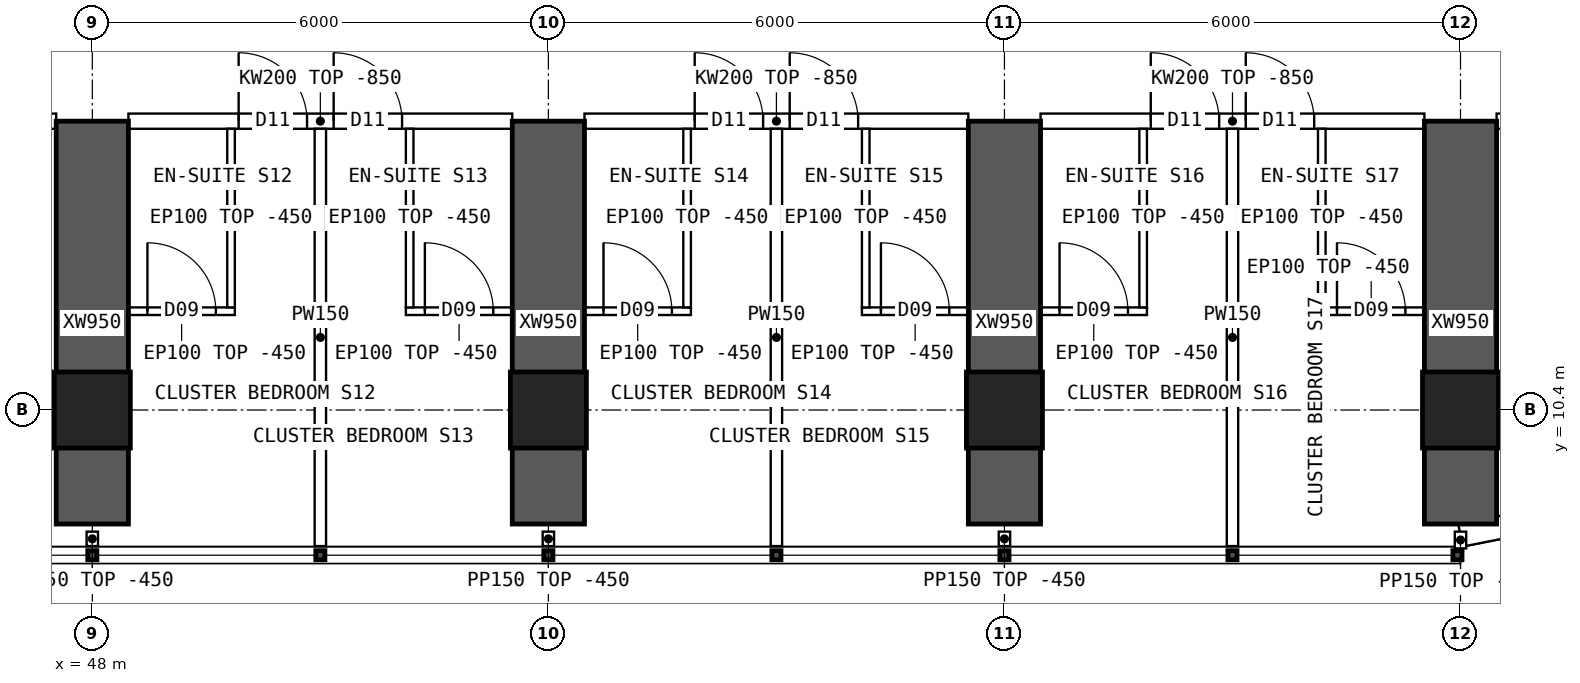
"""IFC4 building model, lengths in metres.
Left out: names, types, materials, properties, quantities, classifications, styles, units other than length and angle.
Written with IfcOpenShell. Run it as: python <this file> out.ifc"""

import sys

from ifc_helpers import new_model, si_unit, direction, frame, frame_2d, origin, origin_2d, place, context, subcontext, project, spatial, polyline, rectangle, hollow_rectangle, outline, extrude, element, fill, save


model = new_model("IFC4")
c1 = context("Model", 3, precision=1e-05, world=origin(), true_north=direction((0.0, 1.0)))
c2 = subcontext(c1, "Body", "Model", "MODEL_VIEW")
j1 = project(units=[si_unit("LENGTHUNIT", "METRE"), si_unit("PLANEANGLEUNIT", "RADIAN")], contexts=[c1])
p1 = place(None, origin())
s1 = spatial("IfcSite", under=j1, at=p1, CompositionType="ELEMENT")
p2 = place(p1, origin())
s2 = spatial("IfcBuilding", under=s1, at=p2, CompositionType="ELEMENT")
p3 = place(p2, frame((0.0, 0.0, 80.65)))
s3 = spatial("IfcBuildingStorey", under=s2, at=p3, CompositionType="ELEMENT", Elevation=80.65)
for number, where, z_axis, x_axis in (
    (1, (48.0, 10.4, 0.0), (0.0, 0.0, 1.0), (1.0, 0.0, 0.0)),
    (2, (54.0, 10.4, 0.0), (0.0, 0.0, 1.0), (1.0, 0.0, 0.0)),
    (3, (60.0, 10.4, 0.0), (0.0, 0.0, 1.0), (1.0, 0.0, 0.0)),
    (4, (66.0, 10.4, 0.0), (0.0, 0.0, 1.0), (1.0, 0.0, 0.0)),
):
    element("IfcColumn", number, at=place(p3, frame(where, z_axis=z_axis, x_axis=x_axis)), inside=s3, PredefinedType="COLUMN", context=c2, shape_type="SweptSolid", body=[
        extrude(hollow_rectangle(XDim=1.0, YDim=1.0, WallThickness=0.1, at=origin_2d()), origin(), (0.0, 0.0, 1.0), 3.75),
    ])
for number, where, z_axis, x_axis in (
    (5, (48.0, 8.9, 0.0), (0.0, 0.0, 1.0), (0.0, 1.0, 0.0)),
    (6, (54.0, 8.9, 0.0), (0.0, 0.0, 1.0), (0.0, 1.0, 0.0)),
    (7, (60.0, 8.9, 0.0), (0.0, 0.0, 1.0), (0.0, 1.0, 0.0)),
    (8, (66.0, 8.9, 0.0), (0.0, 0.0, 1.0), (0.0, 1.0, 0.0)),
):
    element("IfcWall", number, at=place(p3, frame(where, z_axis=z_axis, x_axis=x_axis)), inside=s3, PredefinedType="SHEAR", context=c2, shape_type="SweptSolid", body=[
        extrude(rectangle(XDim=5.3, YDim=0.95, at=frame_2d((2.65, 0.0))), origin(), (0.0, 0.0, 1.0), 3.75),
    ])
p4 = place(p3, frame((66.0, 8.75, 0.0), z_axis=(0.0, 0.0, 1.0), x_axis=(0.980791473772, 0.195059183267, 0.0)))
e9 = element("IfcWall", 9, at=p4, inside=s3, PredefinedType="SOLIDWALL", context=c2, shape_type="SweptSolid", body=[
    extrude(outline(polyline([(-0.03, -0.15), (3.717, -0.15), (3.657, 0.15), (0.03, 0.15), (-0.03, -0.15)])), origin(), (0.0, 0.0, 1.0), 3.3),
])
p5 = place(p4, frame((1.144, 0.0, 0.9)))
e10 = element("IfcOpeningElement", 10, at=p5, cuts=e9, PredefinedType="OPENING", context=c2, shape_type="SweptSolid", body=[
    extrude(rectangle(XDim=1.4, YDim=1.8, at=frame_2d((0.7, 0.9))), frame((0.0, 0.16, 0.0), z_axis=(0.0, -1.0, 0.0), x_axis=(1.0, 0.0, 0.0)), (0.0, 0.0, 1.0), 0.32),
])
p6 = place(p3, frame((42.475, 14.2, 0.0), z_axis=(0.0, 0.0, 1.0), x_axis=(1.0, 0.0, 0.0)))
e11 = element("IfcWall", 11, at=p6, inside=s3, PredefinedType="SOLIDWALL", context=c2, shape_type="SweptSolid", body=[
    extrude(outline(polyline([(0.0, 0.0), (5.05, 0.0), (5.05, 2.9), (0.0, 2.9), (0.0, 0.0)])), frame((0.0, 0.1, 0.0), z_axis=(0.0, -1.0, 0.0), x_axis=(1.0, 0.0, 0.0)), (0.0, 0.0, 1.0), 0.2),
])
p7 = place(p6, frame((0.6, 0.0, 0.0)))
e12 = element("IfcOpeningElement", 12, at=p7, cuts=e11, PredefinedType="OPENING", context=c2, shape_type="SweptSolid", body=[
    extrude(rectangle(XDim=1.0, YDim=2.1, at=frame_2d((0.5, 1.05))), frame((0.0, 0.11, 0.0), z_axis=(0.0, -1.0, 0.0), x_axis=(1.0, 0.0, 0.0)), (0.0, 0.0, 1.0), 0.22),
])
p8 = place(p3, frame((48.475, 14.2, 0.0), z_axis=(0.0, 0.0, 1.0), x_axis=(1.0, 0.0, 0.0)))
e13 = element("IfcWall", 13, at=p8, inside=s3, PredefinedType="SOLIDWALL", context=c2, shape_type="SweptSolid", body=[
    extrude(outline(polyline([(0.0, 0.0), (5.05, 0.0), (5.05, 2.9), (0.0, 2.9), (0.0, 0.0)])), frame((0.0, 0.1, 0.0), z_axis=(0.0, -1.0, 0.0), x_axis=(1.0, 0.0, 0.0)), (0.0, 0.0, 1.0), 0.2),
])
p9 = place(p8, frame((1.45, 0.0, 0.0)))
e14 = element("IfcOpeningElement", 14, at=p9, cuts=e13, PredefinedType="OPENING", context=c2, shape_type="SweptSolid", body=[
    extrude(rectangle(XDim=0.9, YDim=2.1, at=frame_2d((0.45, 1.05))), frame((0.0, 0.11, 0.0), z_axis=(0.0, -1.0, 0.0), x_axis=(1.0, 0.0, 0.0)), (0.0, 0.0, 1.0), 0.22),
])
p10 = place(p8, frame((2.7, 0.0, 0.0)))
e15 = element("IfcOpeningElement", 15, at=p10, cuts=e13, PredefinedType="OPENING", context=c2, shape_type="SweptSolid", body=[
    extrude(rectangle(XDim=0.9, YDim=2.1, at=frame_2d((0.45, 1.05))), frame((0.0, 0.11, 0.0), z_axis=(0.0, -1.0, 0.0), x_axis=(1.0, 0.0, 0.0)), (0.0, 0.0, 1.0), 0.22),
])
p11 = place(p3, frame((54.475, 14.2, 0.0), z_axis=(0.0, 0.0, 1.0), x_axis=(1.0, 0.0, 0.0)))
e16 = element("IfcWall", 16, at=p11, inside=s3, PredefinedType="SOLIDWALL", context=c2, shape_type="SweptSolid", body=[
    extrude(outline(polyline([(0.0, 0.0), (5.05, 0.0), (5.05, 2.9), (0.0, 2.9), (0.0, 0.0)])), frame((0.0, 0.1, 0.0), z_axis=(0.0, -1.0, 0.0), x_axis=(1.0, 0.0, 0.0)), (0.0, 0.0, 1.0), 0.2),
])
p12 = place(p11, frame((1.45, 0.0, 0.0)))
e17 = element("IfcOpeningElement", 17, at=p12, cuts=e16, PredefinedType="OPENING", context=c2, shape_type="SweptSolid", body=[
    extrude(rectangle(XDim=0.9, YDim=2.1, at=frame_2d((0.45, 1.05))), frame((0.0, 0.11, 0.0), z_axis=(0.0, -1.0, 0.0), x_axis=(1.0, 0.0, 0.0)), (0.0, 0.0, 1.0), 0.22),
])
p13 = place(p11, frame((2.7, 0.0, 0.0)))
e18 = element("IfcOpeningElement", 18, at=p13, cuts=e16, PredefinedType="OPENING", context=c2, shape_type="SweptSolid", body=[
    extrude(rectangle(XDim=0.9, YDim=2.1, at=frame_2d((0.45, 1.05))), frame((0.0, 0.11, 0.0), z_axis=(0.0, -1.0, 0.0), x_axis=(1.0, 0.0, 0.0)), (0.0, 0.0, 1.0), 0.22),
])
p14 = place(p3, frame((60.475, 14.2, 0.0), z_axis=(0.0, 0.0, 1.0), x_axis=(1.0, 0.0, 0.0)))
e19 = element("IfcWall", 19, at=p14, inside=s3, PredefinedType="SOLIDWALL", context=c2, shape_type="SweptSolid", body=[
    extrude(outline(polyline([(0.0, 0.0), (5.05, 0.0), (5.05, 2.9), (0.0, 2.9), (0.0, 0.0)])), frame((0.0, 0.1, 0.0), z_axis=(0.0, -1.0, 0.0), x_axis=(1.0, 0.0, 0.0)), (0.0, 0.0, 1.0), 0.2),
])
p15 = place(p14, frame((1.45, 0.0, 0.0)))
e20 = element("IfcOpeningElement", 20, at=p15, cuts=e19, PredefinedType="OPENING", context=c2, shape_type="SweptSolid", body=[
    extrude(rectangle(XDim=0.9, YDim=2.1, at=frame_2d((0.45, 1.05))), frame((0.0, 0.11, 0.0), z_axis=(0.0, -1.0, 0.0), x_axis=(1.0, 0.0, 0.0)), (0.0, 0.0, 1.0), 0.22),
])
p16 = place(p14, frame((2.7, 0.0, 0.0)))
e21 = element("IfcOpeningElement", 21, at=p16, cuts=e19, PredefinedType="OPENING", context=c2, shape_type="SweptSolid", body=[
    extrude(rectangle(XDim=0.9, YDim=2.1, at=frame_2d((0.45, 1.05))), frame((0.0, 0.11, 0.0), z_axis=(0.0, -1.0, 0.0), x_axis=(1.0, 0.0, 0.0)), (0.0, 0.0, 1.0), 0.22),
])
p17 = place(p3, frame((66.475, 14.2, 0.0), z_axis=(0.0, 0.0, 1.0), x_axis=(1.0, 0.0, 0.0)))
e22 = element("IfcWall", 22, at=p17, inside=s3, PredefinedType="SOLIDWALL", context=c2, shape_type="SweptSolid", body=[
    extrude(rectangle(XDim=1.925, YDim=0.2, at=frame_2d((0.962, 0.0))), origin(), (0.0, 0.0, 1.0), 3.3),
])
p18 = place(p17, frame((0.2, 0.0, 0.0)))
e23 = element("IfcOpeningElement", 23, at=p18, cuts=e22, PredefinedType="OPENING", context=c2, shape_type="SweptSolid", body=[
    extrude(rectangle(XDim=0.9, YDim=2.1, at=frame_2d((0.45, 1.05))), frame((0.0, 0.11, 0.0), z_axis=(0.0, -1.0, 0.0), x_axis=(1.0, 0.0, 0.0)), (0.0, 0.0, 1.0), 0.22),
])
p19 = place(p3, frame((51.0, 8.61, 0.0), z_axis=(0.0, 0.0, 1.0), x_axis=(0.0, 1.0, 0.0)))
e24 = element("IfcWall", 24, at=p19, inside=s3, PredefinedType="PARTITIONING", context=c2, shape_type="SweptSolid", body=[
    extrude(outline(polyline([(0.0, 0.0), (5.49, 0.0), (5.49, 2.9), (5.442, 2.9), (5.44, 3.3), (1.992, 3.3), (1.99, 2.9), (1.592, 2.9), (1.59, 3.3), (0.0, 3.3), (0.0, 0.0)])), frame((0.0, 0.075, 0.0), z_axis=(0.0, -1.0, 0.0), x_axis=(1.0, 0.0, 0.0)), (0.0, 0.0, 1.0), 0.15),
])
p20 = place(p3, frame((49.875, 11.7, 0.0), z_axis=(0.0, 0.0, 1.0), x_axis=(-1.0, 0.0, 0.0)))
e25 = element("IfcWall", 25, at=p20, inside=s3, PredefinedType="PARTITIONING", context=c2, shape_type="SweptSolid", body=[
    extrude(rectangle(XDim=1.4, YDim=0.1, at=frame_2d((0.7, 0.0))), origin(), (0.0, 0.0, 1.0), 3.3),
])
p21 = place(p20, frame((0.25, 0.0, 0.0)))
e26 = element("IfcOpeningElement", 26, at=p21, cuts=e25, PredefinedType="OPENING", context=c2, shape_type="SweptSolid", body=[
    extrude(rectangle(XDim=0.9, YDim=2.1, at=frame_2d((0.45, 1.05))), frame((0.0, 0.06, 0.0), z_axis=(0.0, -1.0, 0.0), x_axis=(1.0, 0.0, 0.0)), (0.0, 0.0, 1.0), 0.12),
])
p22 = place(p3, frame((49.825, 11.75, 0.0), z_axis=(0.0, 0.0, 1.0), x_axis=(0.0, 1.0, 0.0)))
e27 = element("IfcWall", 27, at=p22, inside=s3, PredefinedType="PARTITIONING", context=c2, shape_type="SweptSolid", body=[
    extrude(outline(polyline([(0.0, 0.0), (2.35, 0.0), (2.35, 2.9), (2.302, 2.9), (2.3, 3.3), (0.0, 3.3), (0.0, 0.0)])), frame((0.0, 0.05, 0.0), z_axis=(0.0, -1.0, 0.0), x_axis=(1.0, 0.0, 0.0)), (0.0, 0.0, 1.0), 0.1),
])
p23 = place(p3, frame((53.525, 11.7, 0.0), z_axis=(0.0, 0.0, 1.0), x_axis=(-1.0, 0.0, 0.0)))
e28 = element("IfcWall", 28, at=p23, inside=s3, PredefinedType="PARTITIONING", context=c2, shape_type="SweptSolid", body=[
    extrude(rectangle(XDim=1.4, YDim=0.1, at=frame_2d((0.7, 0.0))), origin(), (0.0, 0.0, 1.0), 3.3),
])
p24 = place(p23, frame((0.25, 0.0, 0.0)))
e29 = element("IfcOpeningElement", 29, at=p24, cuts=e28, PredefinedType="OPENING", context=c2, shape_type="SweptSolid", body=[
    extrude(rectangle(XDim=0.9, YDim=2.1, at=frame_2d((0.45, 1.05))), frame((0.0, 0.06, 0.0), z_axis=(0.0, -1.0, 0.0), x_axis=(1.0, 0.0, 0.0)), (0.0, 0.0, 1.0), 0.12),
])
p25 = place(p3, frame((52.175, 11.75, 0.0), z_axis=(0.0, 0.0, 1.0), x_axis=(0.0, 1.0, 0.0)))
e30 = element("IfcWall", 30, at=p25, inside=s3, PredefinedType="PARTITIONING", context=c2, shape_type="SweptSolid", body=[
    extrude(outline(polyline([(0.0, 0.0), (2.35, 0.0), (2.35, 2.9), (2.302, 2.9), (2.3, 3.3), (0.0, 3.3), (0.0, 0.0)])), frame((0.0, 0.05, 0.0), z_axis=(0.0, -1.0, 0.0), x_axis=(1.0, 0.0, 0.0)), (0.0, 0.0, 1.0), 0.1),
])
p26 = place(p3, frame((57.0, 8.61, 0.0), z_axis=(0.0, 0.0, 1.0), x_axis=(0.0, 1.0, 0.0)))
e31 = element("IfcWall", 31, at=p26, inside=s3, PredefinedType="PARTITIONING", context=c2, shape_type="SweptSolid", body=[
    extrude(outline(polyline([(0.0, 0.0), (5.49, 0.0), (5.49, 2.9), (5.442, 2.9), (5.44, 3.3), (1.992, 3.3), (1.99, 2.9), (1.592, 2.9), (1.59, 3.3), (0.0, 3.3), (0.0, 0.0)])), frame((0.0, 0.075, 0.0), z_axis=(0.0, -1.0, 0.0), x_axis=(1.0, 0.0, 0.0)), (0.0, 0.0, 1.0), 0.15),
])
p27 = place(p3, frame((55.875, 11.7, 0.0), z_axis=(0.0, 0.0, 1.0), x_axis=(-1.0, 0.0, 0.0)))
e32 = element("IfcWall", 32, at=p27, inside=s3, PredefinedType="PARTITIONING", context=c2, shape_type="SweptSolid", body=[
    extrude(rectangle(XDim=1.4, YDim=0.1, at=frame_2d((0.7, 0.0))), origin(), (0.0, 0.0, 1.0), 3.3),
])
p28 = place(p27, frame((0.25, 0.0, 0.0)))
e33 = element("IfcOpeningElement", 33, at=p28, cuts=e32, PredefinedType="OPENING", context=c2, shape_type="SweptSolid", body=[
    extrude(rectangle(XDim=0.9, YDim=2.1, at=frame_2d((0.45, 1.05))), frame((0.0, 0.06, 0.0), z_axis=(0.0, -1.0, 0.0), x_axis=(1.0, 0.0, 0.0)), (0.0, 0.0, 1.0), 0.12),
])
p29 = place(p3, frame((55.825, 11.75, 0.0), z_axis=(0.0, 0.0, 1.0), x_axis=(0.0, 1.0, 0.0)))
e34 = element("IfcWall", 34, at=p29, inside=s3, PredefinedType="PARTITIONING", context=c2, shape_type="SweptSolid", body=[
    extrude(outline(polyline([(0.0, 0.0), (2.35, 0.0), (2.35, 2.9), (2.302, 2.9), (2.3, 3.3), (0.0, 3.3), (0.0, 0.0)])), frame((0.0, 0.05, 0.0), z_axis=(0.0, -1.0, 0.0), x_axis=(1.0, 0.0, 0.0)), (0.0, 0.0, 1.0), 0.1),
])
p30 = place(p3, frame((59.525, 11.7, 0.0), z_axis=(0.0, 0.0, 1.0), x_axis=(-1.0, 0.0, 0.0)))
e35 = element("IfcWall", 35, at=p30, inside=s3, PredefinedType="PARTITIONING", context=c2, shape_type="SweptSolid", body=[
    extrude(rectangle(XDim=1.4, YDim=0.1, at=frame_2d((0.7, 0.0))), origin(), (0.0, 0.0, 1.0), 3.3),
])
p31 = place(p30, frame((0.25, 0.0, 0.0)))
e36 = element("IfcOpeningElement", 36, at=p31, cuts=e35, PredefinedType="OPENING", context=c2, shape_type="SweptSolid", body=[
    extrude(rectangle(XDim=0.9, YDim=2.1, at=frame_2d((0.45, 1.05))), frame((0.0, 0.06, 0.0), z_axis=(0.0, -1.0, 0.0), x_axis=(1.0, 0.0, 0.0)), (0.0, 0.0, 1.0), 0.12),
])
p32 = place(p3, frame((58.175, 11.75, 0.0), z_axis=(0.0, 0.0, 1.0), x_axis=(0.0, 1.0, 0.0)))
e37 = element("IfcWall", 37, at=p32, inside=s3, PredefinedType="PARTITIONING", context=c2, shape_type="SweptSolid", body=[
    extrude(outline(polyline([(0.0, 0.0), (2.35, 0.0), (2.35, 2.9), (2.302, 2.9), (2.3, 3.3), (0.0, 3.3), (0.0, 0.0)])), frame((0.0, 0.05, 0.0), z_axis=(0.0, -1.0, 0.0), x_axis=(1.0, 0.0, 0.0)), (0.0, 0.0, 1.0), 0.1),
])
p33 = place(p3, frame((63.0, 8.61, 0.0), z_axis=(0.0, 0.0, 1.0), x_axis=(0.0, 1.0, 0.0)))
e38 = element("IfcWall", 38, at=p33, inside=s3, PredefinedType="PARTITIONING", context=c2, shape_type="SweptSolid", body=[
    extrude(outline(polyline([(0.0, 0.0), (5.49, 0.0), (5.49, 2.9), (5.442, 2.9), (5.44, 3.3), (1.992, 3.3), (1.99, 2.9), (1.592, 2.9), (1.59, 3.3), (0.0, 3.3), (0.0, 0.0)])), frame((0.0, 0.075, 0.0), z_axis=(0.0, -1.0, 0.0), x_axis=(1.0, 0.0, 0.0)), (0.0, 0.0, 1.0), 0.15),
])
p34 = place(p3, frame((61.875, 11.7, 0.0), z_axis=(0.0, 0.0, 1.0), x_axis=(-1.0, 0.0, 0.0)))
e39 = element("IfcWall", 39, at=p34, inside=s3, PredefinedType="PARTITIONING", context=c2, shape_type="SweptSolid", body=[
    extrude(rectangle(XDim=1.4, YDim=0.1, at=frame_2d((0.7, 0.0))), origin(), (0.0, 0.0, 1.0), 3.3),
])
p35 = place(p34, frame((0.25, 0.0, 0.0)))
e40 = element("IfcOpeningElement", 40, at=p35, cuts=e39, PredefinedType="OPENING", context=c2, shape_type="SweptSolid", body=[
    extrude(rectangle(XDim=0.9, YDim=2.1, at=frame_2d((0.45, 1.05))), frame((0.0, 0.06, 0.0), z_axis=(0.0, -1.0, 0.0), x_axis=(1.0, 0.0, 0.0)), (0.0, 0.0, 1.0), 0.12),
])
p36 = place(p3, frame((61.825, 11.75, 0.0), z_axis=(0.0, 0.0, 1.0), x_axis=(0.0, 1.0, 0.0)))
e41 = element("IfcWall", 41, at=p36, inside=s3, PredefinedType="PARTITIONING", context=c2, shape_type="SweptSolid", body=[
    extrude(outline(polyline([(0.0, 0.0), (2.35, 0.0), (2.35, 2.9), (2.302, 2.9), (2.3, 3.3), (0.0, 3.3), (0.0, 0.0)])), frame((0.0, 0.05, 0.0), z_axis=(0.0, -1.0, 0.0), x_axis=(1.0, 0.0, 0.0)), (0.0, 0.0, 1.0), 0.1),
])
p37 = place(p3, frame((65.525, 11.7, 0.0), z_axis=(0.0, 0.0, 1.0), x_axis=(-1.0, 0.0, 0.0)))
e42 = element("IfcWall", 42, at=p37, inside=s3, PredefinedType="PARTITIONING", context=c2, shape_type="SweptSolid", body=[
    extrude(rectangle(XDim=1.4, YDim=0.1, at=frame_2d((0.7, 0.0))), origin(), (0.0, 0.0, 1.0), 3.3),
])
p38 = place(p37, frame((0.25, 0.0, 0.0)))
e43 = element("IfcOpeningElement", 43, at=p38, cuts=e42, PredefinedType="OPENING", context=c2, shape_type="SweptSolid", body=[
    extrude(rectangle(XDim=0.9, YDim=2.1, at=frame_2d((0.45, 1.05))), frame((0.0, 0.06, 0.0), z_axis=(0.0, -1.0, 0.0), x_axis=(1.0, 0.0, 0.0)), (0.0, 0.0, 1.0), 0.12),
])
p39 = place(p3, frame((64.175, 11.75, 0.0), z_axis=(0.0, 0.0, 1.0), x_axis=(0.0, 1.0, 0.0)))
e44 = element("IfcWall", 44, at=p39, inside=s3, PredefinedType="PARTITIONING", context=c2, shape_type="SweptSolid", body=[
    extrude(outline(polyline([(0.0, 0.0), (2.35, 0.0), (2.35, 2.9), (2.302, 2.9), (2.3, 3.3), (0.0, 3.3), (0.0, 0.0)])), frame((0.0, 0.05, 0.0), z_axis=(0.0, -1.0, 0.0), x_axis=(1.0, 0.0, 0.0)), (0.0, 0.0, 1.0), 0.1),
])
for number, where, z_axis, x_axis in (
    (45, (48.0, 8.8, 0.0), (0.0, 0.0, 1.0), (0.0, -1.0, 0.0)),
    (46, (54.0, 8.8, 0.0), (0.0, 0.0, 1.0), (0.0, -1.0, 0.0)),
    (47, (60.0, 8.8, 0.0), (0.0, 0.0, 1.0), (0.0, -1.0, 0.0)),
):
    element("IfcWall", number, at=place(p3, frame(where, z_axis=z_axis, x_axis=x_axis)), inside=s3, PredefinedType="PARTITIONING", context=c2, shape_type="SweptSolid", body=[
        extrude(rectangle(XDim=0.19, YDim=0.15, at=frame_2d((0.095, 0.0))), origin(), (0.0, 0.0, 1.0), 3.3),
    ])
p40 = place(p3, frame((66.0, 8.8, 0.0), z_axis=(0.0, 0.0, 1.0), x_axis=(0.0, -1.0, 0.0)))
e48 = element("IfcWall", 48, at=p40, inside=s3, PredefinedType="PARTITIONING", context=c2, shape_type="SweptSolid", body=[
    extrude(rectangle(XDim=0.22, YDim=0.15, at=frame_2d((0.11, 0.0))), origin(), (0.0, 0.0, 1.0), 3.3),
])
p41 = place(p21, origin())
e49 = element("IfcDoor", 49, at=p41, inside=s3, OperationType="SINGLE_SWING_RIGHT", PredefinedType="DOOR", context=c2, shape_type="SweptSolid", body=[
    extrude(rectangle(XDim=0.9, YDim=2.1, at=frame_2d((0.45, 1.05))), frame((0.0, 0.025, 0.0), z_axis=(0.0, -1.0, 0.0), x_axis=(1.0, 0.0, 0.0)), (0.0, 0.0, 1.0), 0.05),
])
fill(e26, e49)
p42 = place(p9, origin())
e50 = element("IfcDoor", 50, at=p42, inside=s3, OperationType="SINGLE_SWING_LEFT", PredefinedType="DOOR", context=c2, shape_type="SweptSolid", body=[
    extrude(rectangle(XDim=0.9, YDim=2.1, at=frame_2d((0.45, 1.05))), frame((0.0, 0.025, 0.0), z_axis=(0.0, -1.0, 0.0), x_axis=(1.0, 0.0, 0.0)), (0.0, 0.0, 1.0), 0.05),
])
fill(e14, e50)
p43 = place(p24, origin())
e51 = element("IfcDoor", 51, at=p43, inside=s3, OperationType="SINGLE_SWING_RIGHT", PredefinedType="DOOR", context=c2, shape_type="SweptSolid", body=[
    extrude(rectangle(XDim=0.9, YDim=2.1, at=frame_2d((0.45, 1.05))), frame((0.0, 0.025, 0.0), z_axis=(0.0, -1.0, 0.0), x_axis=(1.0, 0.0, 0.0)), (0.0, 0.0, 1.0), 0.05),
])
fill(e29, e51)
p44 = place(p10, origin())
e52 = element("IfcDoor", 52, at=p44, inside=s3, OperationType="SINGLE_SWING_LEFT", PredefinedType="DOOR", context=c2, shape_type="SweptSolid", body=[
    extrude(rectangle(XDim=0.9, YDim=2.1, at=frame_2d((0.45, 1.05))), frame((0.0, 0.025, 0.0), z_axis=(0.0, -1.0, 0.0), x_axis=(1.0, 0.0, 0.0)), (0.0, 0.0, 1.0), 0.05),
])
fill(e15, e52)
p45 = place(p28, origin())
e53 = element("IfcDoor", 53, at=p45, inside=s3, OperationType="SINGLE_SWING_RIGHT", PredefinedType="DOOR", context=c2, shape_type="SweptSolid", body=[
    extrude(rectangle(XDim=0.9, YDim=2.1, at=frame_2d((0.45, 1.05))), frame((0.0, 0.025, 0.0), z_axis=(0.0, -1.0, 0.0), x_axis=(1.0, 0.0, 0.0)), (0.0, 0.0, 1.0), 0.05),
])
fill(e33, e53)
p46 = place(p12, origin())
e54 = element("IfcDoor", 54, at=p46, inside=s3, OperationType="SINGLE_SWING_LEFT", PredefinedType="DOOR", context=c2, shape_type="SweptSolid", body=[
    extrude(rectangle(XDim=0.9, YDim=2.1, at=frame_2d((0.45, 1.05))), frame((0.0, 0.025, 0.0), z_axis=(0.0, -1.0, 0.0), x_axis=(1.0, 0.0, 0.0)), (0.0, 0.0, 1.0), 0.05),
])
fill(e17, e54)
p47 = place(p31, origin())
e55 = element("IfcDoor", 55, at=p47, inside=s3, OperationType="SINGLE_SWING_RIGHT", PredefinedType="DOOR", context=c2, shape_type="SweptSolid", body=[
    extrude(rectangle(XDim=0.9, YDim=2.1, at=frame_2d((0.45, 1.05))), frame((0.0, 0.025, 0.0), z_axis=(0.0, -1.0, 0.0), x_axis=(1.0, 0.0, 0.0)), (0.0, 0.0, 1.0), 0.05),
])
fill(e36, e55)
p48 = place(p13, origin())
e56 = element("IfcDoor", 56, at=p48, inside=s3, OperationType="SINGLE_SWING_LEFT", PredefinedType="DOOR", context=c2, shape_type="SweptSolid", body=[
    extrude(rectangle(XDim=0.9, YDim=2.1, at=frame_2d((0.45, 1.05))), frame((0.0, 0.025, 0.0), z_axis=(0.0, -1.0, 0.0), x_axis=(1.0, 0.0, 0.0)), (0.0, 0.0, 1.0), 0.05),
])
fill(e18, e56)
p49 = place(p35, origin())
e57 = element("IfcDoor", 57, at=p49, inside=s3, OperationType="SINGLE_SWING_RIGHT", PredefinedType="DOOR", context=c2, shape_type="SweptSolid", body=[
    extrude(rectangle(XDim=0.9, YDim=2.1, at=frame_2d((0.45, 1.05))), frame((0.0, 0.025, 0.0), z_axis=(0.0, -1.0, 0.0), x_axis=(1.0, 0.0, 0.0)), (0.0, 0.0, 1.0), 0.05),
])
fill(e40, e57)
p50 = place(p15, origin())
e58 = element("IfcDoor", 58, at=p50, inside=s3, OperationType="SINGLE_SWING_LEFT", PredefinedType="DOOR", context=c2, shape_type="SweptSolid", body=[
    extrude(rectangle(XDim=0.9, YDim=2.1, at=frame_2d((0.45, 1.05))), frame((0.0, 0.025, 0.0), z_axis=(0.0, -1.0, 0.0), x_axis=(1.0, 0.0, 0.0)), (0.0, 0.0, 1.0), 0.05),
])
fill(e20, e58)
p51 = place(p38, origin())
e59 = element("IfcDoor", 59, at=p51, inside=s3, OperationType="SINGLE_SWING_RIGHT", PredefinedType="DOOR", context=c2, shape_type="SweptSolid", body=[
    extrude(rectangle(XDim=0.9, YDim=2.1, at=frame_2d((0.45, 1.05))), frame((0.0, 0.025, 0.0), z_axis=(0.0, -1.0, 0.0), x_axis=(1.0, 0.0, 0.0)), (0.0, 0.0, 1.0), 0.05),
])
fill(e43, e59)
p52 = place(p16, origin())
e60 = element("IfcDoor", 60, at=p52, inside=s3, OperationType="SINGLE_SWING_LEFT", PredefinedType="DOOR", context=c2, shape_type="SweptSolid", body=[
    extrude(rectangle(XDim=0.9, YDim=2.1, at=frame_2d((0.45, 1.05))), frame((0.0, 0.025, 0.0), z_axis=(0.0, -1.0, 0.0), x_axis=(1.0, 0.0, 0.0)), (0.0, 0.0, 1.0), 0.05),
])
fill(e21, e60)
save(model, sys.argv[1])
